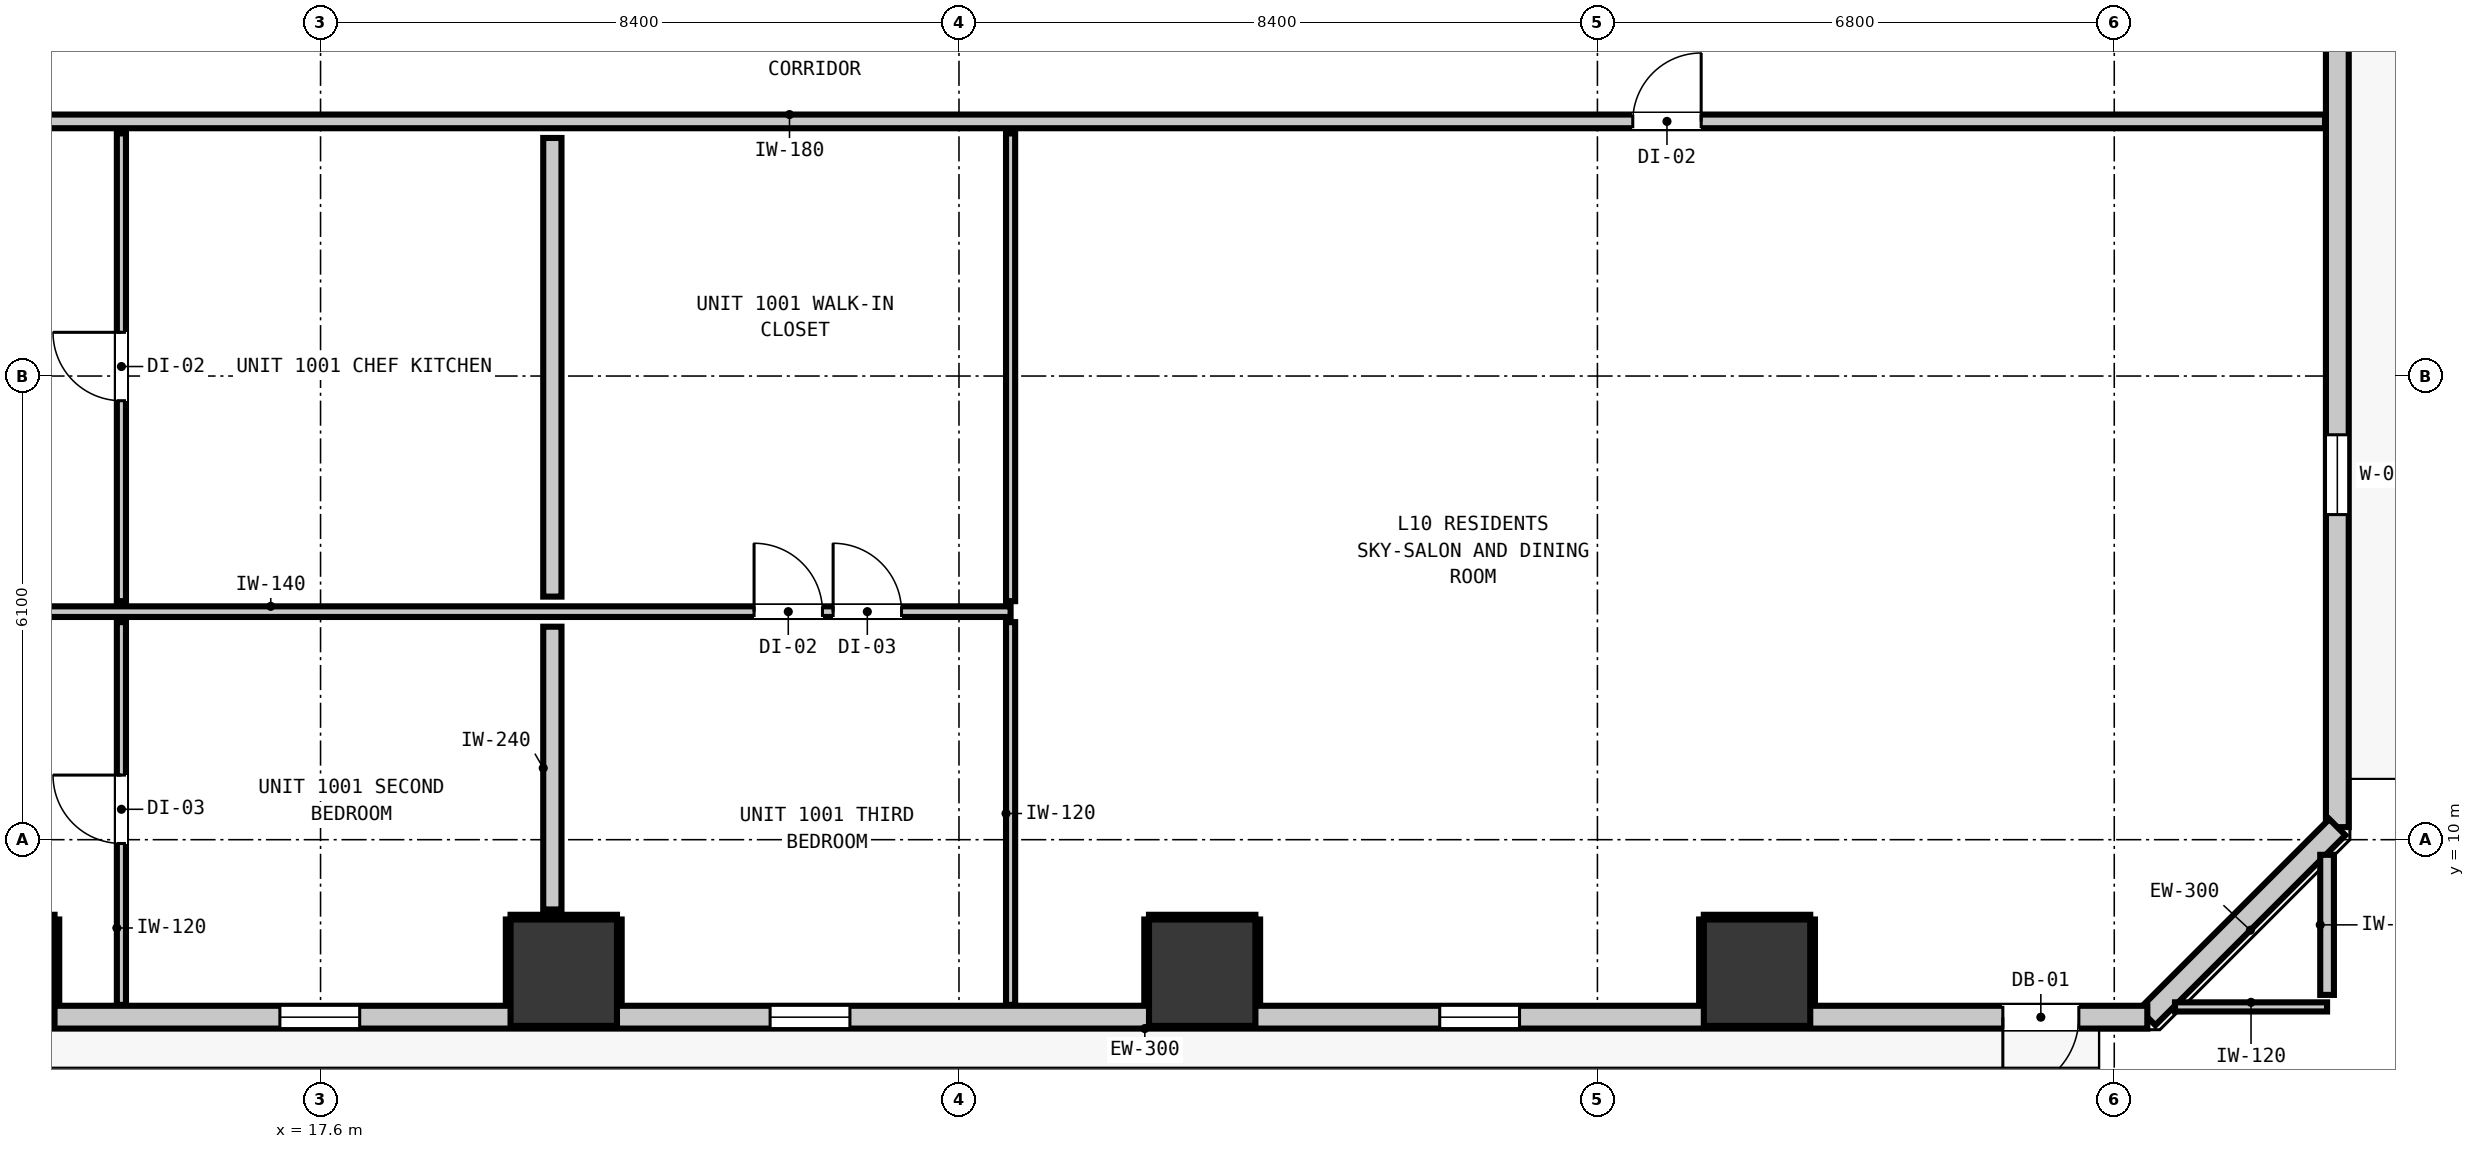
"""IFC4 building model, lengths in metres.
Left out: names, types, materials, properties, quantities, classifications, styles, units other than length and angle.
Written with IfcOpenShell. Run it as: python <this file> out.ifc"""

import sys

from ifc_helpers import new_model, si_unit, direction, frame, frame_2d, origin, origin_2d, place, context, subcontext, project, spatial, rectangle, extrude, element, fill, save


model = new_model("IFC4")
c1 = context("Model", 3, precision=1e-05, world=origin(), true_north=direction((0.0, 1.0)))
c2 = subcontext(c1, "Body", "Model", "MODEL_VIEW")
j1 = project(units=[si_unit("LENGTHUNIT", "METRE"), si_unit("PLANEANGLEUNIT", "RADIAN")], contexts=[c1])
p1 = place(None, origin())
s1 = spatial("IfcSite", under=j1, at=p1, CompositionType="ELEMENT")
p2 = place(p1, origin())
s2 = spatial("IfcBuilding", under=s1, at=p2, CompositionType="ELEMENT")
p3 = place(p2, frame((0.0, 0.0, 38.6)))
s3 = spatial("IfcBuildingStorey", under=s2, at=p3, CompositionType="ELEMENT", Elevation=38.6)
for number, where, z_axis, x_axis in (
    (1, (13.4, 8.25, 0.0), (0.0, 0.0, 1.0), (1.0, 0.0, 0.0)),
    (2, (20.8, 8.25, 0.0), (0.0, 0.0, 1.0), (1.0, 0.0, 0.0)),
    (3, (29.2, 8.25, 0.0), (0.0, 0.0, 1.0), (1.0, 0.0, 0.0)),
    (4, (36.5, 8.25, 0.0), (0.0, 0.0, 1.0), (1.0, 0.0, 0.0)),
):
    element("IfcColumn", number, at=place(p3, frame(where, z_axis=z_axis, x_axis=x_axis)), inside=s3, PredefinedType="COLUMN", context=c2, shape_type="SweptSolid", body=[
        extrude(rectangle(XDim=1.4, YDim=1.4, at=origin_2d()), origin(), (0.0, 0.0, 1.0), 2.9),
    ])
p4 = place(p3, frame((44.135, 44.835, 0.0), z_axis=(0.0, 0.0, 1.0), x_axis=(0.0, -1.0, 0.0)))
e5 = element("IfcWall", 5, at=p4, inside=s3, PredefinedType="STANDARD", context=c2, shape_type="SweptSolid", body=[
    extrude(rectangle(XDim=34.67, YDim=0.3, at=frame_2d((17.335, 0.0))), origin(), (0.0, 0.0, 1.0), 2.9),
])
p5 = place(p4, frame((1.251, 0.0, 0.0)))
e6 = element("IfcOpeningElement", 6, at=p5, cuts=e5, PredefinedType="OPENING", context=c2, shape_type="SweptSolid", body=[
    extrude(rectangle(XDim=1.0, YDim=2.15, at=frame_2d((0.5, 1.075))), frame((0.0, 0.16, 0.0), z_axis=(0.0, -1.0, 0.0), x_axis=(1.0, 0.0, 0.0)), (0.0, 0.0, 1.0), 0.32),
])
p6 = place(p4, frame((29.508, 0.0, 0.85)))
e7 = element("IfcOpeningElement", 7, at=p6, cuts=e5, PredefinedType="OPENING", context=c2, shape_type="SweptSolid", body=[
    extrude(rectangle(XDim=1.05, YDim=1.65, at=frame_2d((0.525, 0.825))), frame((0.0, 0.16, 0.0), z_axis=(0.0, -1.0, 0.0), x_axis=(1.0, 0.0, 0.0)), (0.0, 0.0, 1.0), 0.32),
])
p7 = place(p4, frame((19.619, 0.0, 0.85)))
e8 = element("IfcOpeningElement", 8, at=p7, cuts=e5, PredefinedType="OPENING", context=c2, shape_type="SweptSolid", body=[
    extrude(rectangle(XDim=1.05, YDim=1.65, at=frame_2d((0.525, 0.825))), frame((0.0, 0.16, 0.0), z_axis=(0.0, -1.0, 0.0), x_axis=(1.0, 0.0, 0.0)), (0.0, 0.0, 1.0), 0.32),
])
p8 = place(p3, frame((44.135, 10.165, 0.0), z_axis=(0.0, 0.0, 1.0), x_axis=(-0.707106781187, -0.707106781187, 0.0)))
e9 = element("IfcWall", 9, at=p8, inside=s3, PredefinedType="STANDARD", context=c2, shape_type="SweptSolid", body=[
    extrude(rectangle(XDim=3.536, YDim=0.3, at=frame_2d((1.768, 0.0))), origin(), (0.0, 0.0, 1.0), 2.9),
])
p9 = place(p3, frame((41.635, 7.665, 0.0), z_axis=(0.0, 0.0, 1.0), x_axis=(-1.0, 0.0, 0.0)))
e10 = element("IfcWall", 10, at=p9, inside=s3, PredefinedType="STANDARD", context=c2, shape_type="SweptSolid", body=[
    extrude(rectangle(XDim=37.47, YDim=0.3, at=frame_2d((18.735, 0.0))), origin(), (0.0, 0.0, 1.0), 2.9),
])
p10 = place(p9, frame((0.901, 0.0, 0.0)))
e11 = element("IfcOpeningElement", 11, at=p10, cuts=e10, PredefinedType="OPENING", context=c2, shape_type="SweptSolid", body=[
    extrude(rectangle(XDim=1.0, YDim=2.15, at=frame_2d((0.5, 1.075))), frame((0.0, 0.16, 0.0), z_axis=(0.0, -1.0, 0.0), x_axis=(1.0, 0.0, 0.0)), (0.0, 0.0, 1.0), 0.32),
])
p11 = place(p9, frame((32.064, 0.0, 0.85)))
e12 = element("IfcOpeningElement", 12, at=p11, cuts=e10, PredefinedType="OPENING", context=c2, shape_type="SweptSolid", body=[
    extrude(rectangle(XDim=1.05, YDim=1.65, at=frame_2d((0.525, 0.825))), frame((0.0, 0.16, 0.0), z_axis=(0.0, -1.0, 0.0), x_axis=(1.0, 0.0, 0.0)), (0.0, 0.0, 1.0), 0.32),
])
p12 = place(p9, frame((36.621, 0.0, 0.85)))
e13 = element("IfcOpeningElement", 13, at=p12, cuts=e10, PredefinedType="OPENING", context=c2, shape_type="SweptSolid", body=[
    extrude(rectangle(XDim=0.58, YDim=1.5, at=frame_2d((0.29, 0.75))), frame((0.0, 0.16, 0.0), z_axis=(0.0, -1.0, 0.0), x_axis=(1.0, 0.0, 0.0)), (0.0, 0.0, 1.0), 0.32),
])
p13 = place(p9, frame((23.52, 0.0, 0.85)))
e14 = element("IfcOpeningElement", 14, at=p13, cuts=e10, PredefinedType="OPENING", context=c2, shape_type="SweptSolid", body=[
    extrude(rectangle(XDim=1.05, YDim=1.65, at=frame_2d((0.525, 0.825))), frame((0.0, 0.16, 0.0), z_axis=(0.0, -1.0, 0.0), x_axis=(1.0, 0.0, 0.0)), (0.0, 0.0, 1.0), 0.32),
])
p14 = place(p9, frame((17.07, 0.0, 0.85)))
e15 = element("IfcOpeningElement", 15, at=p14, cuts=e10, PredefinedType="OPENING", context=c2, shape_type="SweptSolid", body=[
    extrude(rectangle(XDim=1.05, YDim=1.65, at=frame_2d((0.525, 0.825))), frame((0.0, 0.16, 0.0), z_axis=(0.0, -1.0, 0.0), x_axis=(1.0, 0.0, 0.0)), (0.0, 0.0, 1.0), 0.32),
])
p15 = place(p9, frame((8.26, 0.0, 0.85)))
e16 = element("IfcOpeningElement", 16, at=p15, cuts=e10, PredefinedType="OPENING", context=c2, shape_type="SweptSolid", body=[
    extrude(rectangle(XDim=1.05, YDim=1.65, at=frame_2d((0.525, 0.825))), frame((0.0, 0.16, 0.0), z_axis=(0.0, -1.0, 0.0), x_axis=(1.0, 0.0, 0.0)), (0.0, 0.0, 1.0), 0.32),
])
p16 = place(p3, frame((1.827, 19.45, 0.0), z_axis=(0.0, 0.0, 1.0), x_axis=(1.0, 0.0, 0.0)))
e17 = element("IfcWall", 17, at=p16, inside=s3, PredefinedType="PARTITIONING", context=c2, shape_type="SweptSolid", body=[
    extrude(rectangle(XDim=42.146, YDim=0.18, at=frame_2d((21.073, 0.0))), origin(), (0.0, 0.0, 1.0), 2.9),
])
p17 = place(p16, frame((9.848, 0.0, 0.0)))
e18 = element("IfcOpeningElement", 18, at=p17, cuts=e17, PredefinedType="OPENING", context=c2, shape_type="SweptSolid", body=[
    extrude(rectangle(XDim=1.0, YDim=2.15, at=frame_2d((0.5, 1.075))), frame((0.0, 0.1, 0.0), z_axis=(0.0, -1.0, 0.0), x_axis=(1.0, 0.0, 0.0)), (0.0, 0.0, 1.0), 0.2),
])
p18 = place(p16, frame((33.038, 0.0, 0.0)))
e19 = element("IfcOpeningElement", 19, at=p18, cuts=e17, PredefinedType="OPENING", context=c2, shape_type="SweptSolid", body=[
    extrude(rectangle(XDim=0.9, YDim=2.1, at=frame_2d((0.45, 1.05))), frame((0.0, 0.1, 0.0), z_axis=(0.0, -1.0, 0.0), x_axis=(1.0, 0.0, 0.0)), (0.0, 0.0, 1.0), 0.2),
])
p19 = place(p3, frame((1.827, 13.0, 0.0), z_axis=(0.0, 0.0, 1.0), x_axis=(1.0, 0.0, 0.0)))
e20 = element("IfcWall", 20, at=p19, inside=s3, PredefinedType="PARTITIONING", context=c2, shape_type="SweptSolid", body=[
    extrude(rectangle(XDim=24.852, YDim=0.14, at=frame_2d((12.426, 0.0))), origin(), (0.0, 0.0, 1.0), 2.9),
])
p20 = place(p19, frame((7.859, 0.0, 0.0)))
e21 = element("IfcOpeningElement", 21, at=p20, cuts=e20, PredefinedType="OPENING", context=c2, shape_type="SweptSolid", body=[
    extrude(rectangle(XDim=0.9, YDim=2.1, at=frame_2d((0.45, 1.05))), frame((0.0, 0.08, 0.0), z_axis=(0.0, -1.0, 0.0), x_axis=(1.0, 0.0, 0.0)), (0.0, 0.0, 1.0), 0.16),
])
p21 = place(p19, frame((21.477, 0.0, 0.0)))
e22 = element("IfcOpeningElement", 22, at=p21, cuts=e20, PredefinedType="OPENING", context=c2, shape_type="SweptSolid", body=[
    extrude(rectangle(XDim=0.9, YDim=2.1, at=frame_2d((0.45, 1.05))), frame((0.0, 0.08, 0.0), z_axis=(0.0, -1.0, 0.0), x_axis=(1.0, 0.0, 0.0)), (0.0, 0.0, 1.0), 0.16),
])
p22 = place(p19, frame((22.517, 0.0, 0.0)))
e23 = element("IfcOpeningElement", 23, at=p22, cuts=e20, PredefinedType="OPENING", context=c2, shape_type="SweptSolid", body=[
    extrude(rectangle(XDim=0.9, YDim=2.1, at=frame_2d((0.45, 1.05))), frame((0.0, 0.08, 0.0), z_axis=(0.0, -1.0, 0.0), x_axis=(1.0, 0.0, 0.0)), (0.0, 0.0, 1.0), 0.16),
])
p23 = place(p3, frame((41.999, 7.8, 0.0), z_axis=(0.0, 0.0, 1.0), x_axis=(1.0, 0.0, 0.0)))
e24 = element("IfcWall", 24, at=p23, inside=s3, PredefinedType="PARTITIONING", context=c2, shape_type="SweptSolid", body=[
    extrude(rectangle(XDim=2.001, YDim=0.12, at=frame_2d((1.0, 0.0))), origin(), (0.0, 0.0, 1.0), 2.9),
])
p24 = place(p3, frame((20.65, 9.082, 0.0), z_axis=(0.0, 0.0, 1.0), x_axis=(0.0, 1.0, 0.0)))
e25 = element("IfcWall", 25, at=p24, inside=s3, PredefinedType="PARTITIONING", context=c2, shape_type="SweptSolid", body=[
    extrude(rectangle(XDim=3.72, YDim=0.24, at=frame_2d((1.86, 0.0))), origin(), (0.0, 0.0, 1.0), 0.905),
])
p25 = place(p3, frame((20.65, 13.198, 0.0), z_axis=(0.0, 0.0, 1.0), x_axis=(0.0, 1.0, 0.0)))
e26 = element("IfcWall", 26, at=p25, inside=s3, PredefinedType="PARTITIONING", context=c2, shape_type="SweptSolid", body=[
    extrude(rectangle(XDim=6.034, YDim=0.24, at=frame_2d((3.017, 0.0))), origin(), (0.0, 0.0, 1.0), 0.905),
])
p26 = place(p3, frame((44.0, 7.958, 0.0), z_axis=(0.0, 0.0, 1.0), x_axis=(0.0, 1.0, 0.0)))
e27 = element("IfcWall", 27, at=p26, inside=s3, PredefinedType="PARTITIONING", context=c2, shape_type="SweptSolid", body=[
    extrude(rectangle(XDim=1.843, YDim=0.18, at=frame_2d((0.921, 0.0))), origin(), (0.0, 0.0, 1.0), 2.9),
])
p27 = place(p3, frame((14.98, 7.827, 0.0), z_axis=(0.0, 0.0, 1.0), x_axis=(0.0, 1.0, 0.0)))
e28 = element("IfcWall", 28, at=p27, inside=s3, PredefinedType="PARTITIONING", context=c2, shape_type="SweptSolid", body=[
    extrude(rectangle(XDim=5.035, YDim=0.12, at=frame_2d((2.518, 0.0))), origin(), (0.0, 0.0, 1.0), 2.9),
])
p28 = place(p27, frame((2.123, 0.0, 0.0)))
e29 = element("IfcOpeningElement", 29, at=p28, cuts=e28, PredefinedType="OPENING", context=c2, shape_type="SweptSolid", body=[
    extrude(rectangle(XDim=0.9, YDim=2.1, at=frame_2d((0.45, 1.05))), frame((0.0, 0.07, 0.0), z_axis=(0.0, -1.0, 0.0), x_axis=(1.0, 0.0, 0.0)), (0.0, 0.0, 1.0), 0.14),
])
p29 = place(p3, frame((14.98, 13.138, 0.0), z_axis=(0.0, 0.0, 1.0), x_axis=(0.0, 1.0, 0.0)))
e30 = element("IfcWall", 30, at=p29, inside=s3, PredefinedType="PARTITIONING", context=c2, shape_type="SweptSolid", body=[
    extrude(rectangle(XDim=6.154, YDim=0.12, at=frame_2d((3.077, 0.0))), origin(), (0.0, 0.0, 1.0), 2.9),
])
p30 = place(p29, frame((2.637, 0.0, 0.0)))
e31 = element("IfcOpeningElement", 31, at=p30, cuts=e30, PredefinedType="OPENING", context=c2, shape_type="SweptSolid", body=[
    extrude(rectangle(XDim=0.9, YDim=2.1, at=frame_2d((0.45, 1.05))), frame((0.0, 0.07, 0.0), z_axis=(0.0, -1.0, 0.0), x_axis=(1.0, 0.0, 0.0)), (0.0, 0.0, 1.0), 0.14),
])
p31 = place(p3, frame((26.679, 7.827, 0.0), z_axis=(0.0, 0.0, 1.0), x_axis=(0.0, 1.0, 0.0)))
e32 = element("IfcWall", 32, at=p31, inside=s3, PredefinedType="PARTITIONING", context=c2, shape_type="SweptSolid", body=[
    extrude(rectangle(XDim=5.035, YDim=0.12, at=frame_2d((2.518, 0.0))), origin(), (0.0, 0.0, 1.0), 2.9),
])
p32 = place(p3, frame((26.679, 13.138, 0.0), z_axis=(0.0, 0.0, 1.0), x_axis=(0.0, 1.0, 0.0)))
e33 = element("IfcWall", 33, at=p32, inside=s3, PredefinedType="PARTITIONING", context=c2, shape_type="SweptSolid", body=[
    extrude(rectangle(XDim=6.154, YDim=0.12, at=frame_2d((3.077, 0.0))), origin(), (0.0, 0.0, 1.0), 2.9),
])
p33 = place(p3, frame((12.7, 8.982, 0.0), z_axis=(0.0, 0.0, 1.0), x_axis=(1.0, 0.0, 0.0)))
e34 = element("IfcWall", 34, at=p33, inside=s3, PredefinedType="PARTITIONING", context=c2, shape_type="SweptSolid", body=[
    extrude(rectangle(XDim=1.4, YDim=0.06, at=frame_2d((0.7, 0.0))), origin(), (0.0, 0.0, 1.0), 1.45),
])
p34 = place(p3, frame((14.132, 7.83, 0.0), z_axis=(0.0, 0.0, 1.0), x_axis=(0.0, 1.0, 0.0)))
e35 = element("IfcWall", 35, at=p34, inside=s3, PredefinedType="PARTITIONING", context=c2, shape_type="SweptSolid", body=[
    extrude(rectangle(XDim=1.12, YDim=0.06, at=frame_2d((0.56, 0.0))), origin(), (0.0, 0.0, 1.0), 1.45),
])
p35 = place(p3, frame((20.1, 8.982, 0.0), z_axis=(0.0, 0.0, 1.0), x_axis=(1.0, 0.0, 0.0)))
e36 = element("IfcWall", 36, at=p35, inside=s3, PredefinedType="PARTITIONING", context=c2, shape_type="SweptSolid", body=[
    extrude(rectangle(XDim=1.4, YDim=0.06, at=frame_2d((0.7, 0.0))), origin(), (0.0, 0.0, 1.0), 1.45),
])
for number, where, z_axis, x_axis in (
    (37, (20.068, 7.83, 0.0), (0.0, 0.0, 1.0), (0.0, 1.0, 0.0)),
    (38, (21.532, 7.83, 0.0), (0.0, 0.0, 1.0), (0.0, 1.0, 0.0)),
):
    element("IfcWall", number, at=place(p3, frame(where, z_axis=z_axis, x_axis=x_axis)), inside=s3, PredefinedType="PARTITIONING", context=c2, shape_type="SweptSolid", body=[
        extrude(rectangle(XDim=1.12, YDim=0.06, at=frame_2d((0.56, 0.0))), origin(), (0.0, 0.0, 1.0), 1.45),
    ])
p36 = place(p3, frame((28.5, 8.982, 0.0), z_axis=(0.0, 0.0, 1.0), x_axis=(1.0, 0.0, 0.0)))
e39 = element("IfcWall", 39, at=p36, inside=s3, PredefinedType="PARTITIONING", context=c2, shape_type="SweptSolid", body=[
    extrude(rectangle(XDim=1.4, YDim=0.06, at=frame_2d((0.7, 0.0))), origin(), (0.0, 0.0, 1.0), 1.45),
])
for number, where, z_axis, x_axis in (
    (40, (28.468, 7.83, 0.0), (0.0, 0.0, 1.0), (0.0, 1.0, 0.0)),
    (41, (29.932, 7.83, 0.0), (0.0, 0.0, 1.0), (0.0, 1.0, 0.0)),
):
    element("IfcWall", number, at=place(p3, frame(where, z_axis=z_axis, x_axis=x_axis)), inside=s3, PredefinedType="PARTITIONING", context=c2, shape_type="SweptSolid", body=[
        extrude(rectangle(XDim=1.12, YDim=0.06, at=frame_2d((0.56, 0.0))), origin(), (0.0, 0.0, 1.0), 1.45),
    ])
p37 = place(p3, frame((35.8, 8.982, 0.0), z_axis=(0.0, 0.0, 1.0), x_axis=(1.0, 0.0, 0.0)))
e42 = element("IfcWall", 42, at=p37, inside=s3, PredefinedType="PARTITIONING", context=c2, shape_type="SweptSolid", body=[
    extrude(rectangle(XDim=1.4, YDim=0.06, at=frame_2d((0.7, 0.0))), origin(), (0.0, 0.0, 1.0), 1.45),
])
for number, where, z_axis, x_axis in (
    (43, (35.768, 7.83, 0.0), (0.0, 0.0, 1.0), (0.0, 1.0, 0.0)),
    (44, (37.232, 7.83, 0.0), (0.0, 0.0, 1.0), (0.0, 1.0, 0.0)),
):
    element("IfcWall", number, at=place(p3, frame(where, z_axis=z_axis, x_axis=x_axis)), inside=s3, PredefinedType="PARTITIONING", context=c2, shape_type="SweptSolid", body=[
        extrude(rectangle(XDim=1.12, YDim=0.06, at=frame_2d((0.56, 0.0))), origin(), (0.0, 0.0, 1.0), 1.45),
    ])
p38 = place(p10, origin())
e45 = element("IfcDoor", 45, at=p38, inside=s3, OperationType="SINGLE_SWING_RIGHT", PredefinedType="DOOR", context=c2, shape_type="SweptSolid", body=[
    extrude(rectangle(XDim=1.0, YDim=2.15, at=frame_2d((0.5, 1.075))), frame((0.0, 0.025, 0.0), z_axis=(0.0, -1.0, 0.0), x_axis=(1.0, 0.0, 0.0)), (0.0, 0.0, 1.0), 0.05),
])
fill(e11, e45)
p39 = place(p6, origin())
e46 = element("IfcWindow", 46, at=p39, inside=s3, PartitioningType="SINGLE_PANEL", PredefinedType="WINDOW", context=c2, shape_type="SweptSolid", body=[
    extrude(rectangle(XDim=1.05, YDim=1.65, at=frame_2d((0.525, 0.825))), frame((0.0, 0.03, 0.0), z_axis=(0.0, -1.0, 0.0), x_axis=(1.0, 0.0, 0.0)), (0.0, 0.0, 1.0), 0.06),
])
fill(e7, e46)
p40 = place(p13, origin())
e47 = element("IfcWindow", 47, at=p40, inside=s3, PartitioningType="SINGLE_PANEL", PredefinedType="WINDOW", context=c2, shape_type="SweptSolid", body=[
    extrude(rectangle(XDim=1.05, YDim=1.65, at=frame_2d((0.525, 0.825))), frame((0.0, 0.03, 0.0), z_axis=(0.0, -1.0, 0.0), x_axis=(1.0, 0.0, 0.0)), (0.0, 0.0, 1.0), 0.06),
])
fill(e14, e47)
p41 = place(p14, origin())
e48 = element("IfcWindow", 48, at=p41, inside=s3, PartitioningType="SINGLE_PANEL", PredefinedType="WINDOW", context=c2, shape_type="SweptSolid", body=[
    extrude(rectangle(XDim=1.05, YDim=1.65, at=frame_2d((0.525, 0.825))), frame((0.0, 0.03, 0.0), z_axis=(0.0, -1.0, 0.0), x_axis=(1.0, 0.0, 0.0)), (0.0, 0.0, 1.0), 0.06),
])
fill(e15, e48)
p42 = place(p15, origin())
e49 = element("IfcWindow", 49, at=p42, inside=s3, PartitioningType="SINGLE_PANEL", PredefinedType="WINDOW", context=c2, shape_type="SweptSolid", body=[
    extrude(rectangle(XDim=1.05, YDim=1.65, at=frame_2d((0.525, 0.825))), frame((0.0, 0.03, 0.0), z_axis=(0.0, -1.0, 0.0), x_axis=(1.0, 0.0, 0.0)), (0.0, 0.0, 1.0), 0.06),
])
fill(e16, e49)
p43 = place(p30, origin())
e50 = element("IfcDoor", 50, at=p43, inside=s3, OperationType="SINGLE_SWING_RIGHT", PredefinedType="DOOR", context=c2, shape_type="SweptSolid", body=[
    extrude(rectangle(XDim=0.9, YDim=2.1, at=frame_2d((0.45, 1.05))), frame((0.0, 0.025, 0.0), z_axis=(0.0, -1.0, 0.0), x_axis=(1.0, 0.0, 0.0)), (0.0, 0.0, 1.0), 0.05),
])
fill(e31, e50)
p44 = place(p21, origin())
e51 = element("IfcDoor", 51, at=p44, inside=s3, OperationType="SINGLE_SWING_LEFT", PredefinedType="DOOR", context=c2, shape_type="SweptSolid", body=[
    extrude(rectangle(XDim=0.9, YDim=2.1, at=frame_2d((0.45, 1.05))), frame((0.0, 0.025, 0.0), z_axis=(0.0, -1.0, 0.0), x_axis=(1.0, 0.0, 0.0)), (0.0, 0.0, 1.0), 0.05),
])
fill(e22, e51)
p45 = place(p28, origin())
e52 = element("IfcDoor", 52, at=p45, inside=s3, OperationType="SINGLE_SWING_RIGHT", PredefinedType="DOOR", context=c2, shape_type="SweptSolid", body=[
    extrude(rectangle(XDim=0.9, YDim=2.1, at=frame_2d((0.45, 1.05))), frame((0.0, 0.025, 0.0), z_axis=(0.0, -1.0, 0.0), x_axis=(1.0, 0.0, 0.0)), (0.0, 0.0, 1.0), 0.05),
])
fill(e29, e52)
p46 = place(p22, origin())
e53 = element("IfcDoor", 53, at=p46, inside=s3, OperationType="SINGLE_SWING_LEFT", PredefinedType="DOOR", context=c2, shape_type="SweptSolid", body=[
    extrude(rectangle(XDim=0.9, YDim=2.1, at=frame_2d((0.45, 1.05))), frame((0.0, 0.025, 0.0), z_axis=(0.0, -1.0, 0.0), x_axis=(1.0, 0.0, 0.0)), (0.0, 0.0, 1.0), 0.05),
])
fill(e23, e53)
p47 = place(p18, origin())
e54 = element("IfcDoor", 54, at=p47, inside=s3, OperationType="SINGLE_SWING_RIGHT", PredefinedType="DOOR", context=c2, shape_type="SweptSolid", body=[
    extrude(rectangle(XDim=0.9, YDim=2.1, at=frame_2d((0.45, 1.05))), frame((0.0, 0.025, 0.0), z_axis=(0.0, -1.0, 0.0), x_axis=(1.0, 0.0, 0.0)), (0.0, 0.0, 1.0), 0.05),
])
fill(e19, e54)
save(model, sys.argv[1])
